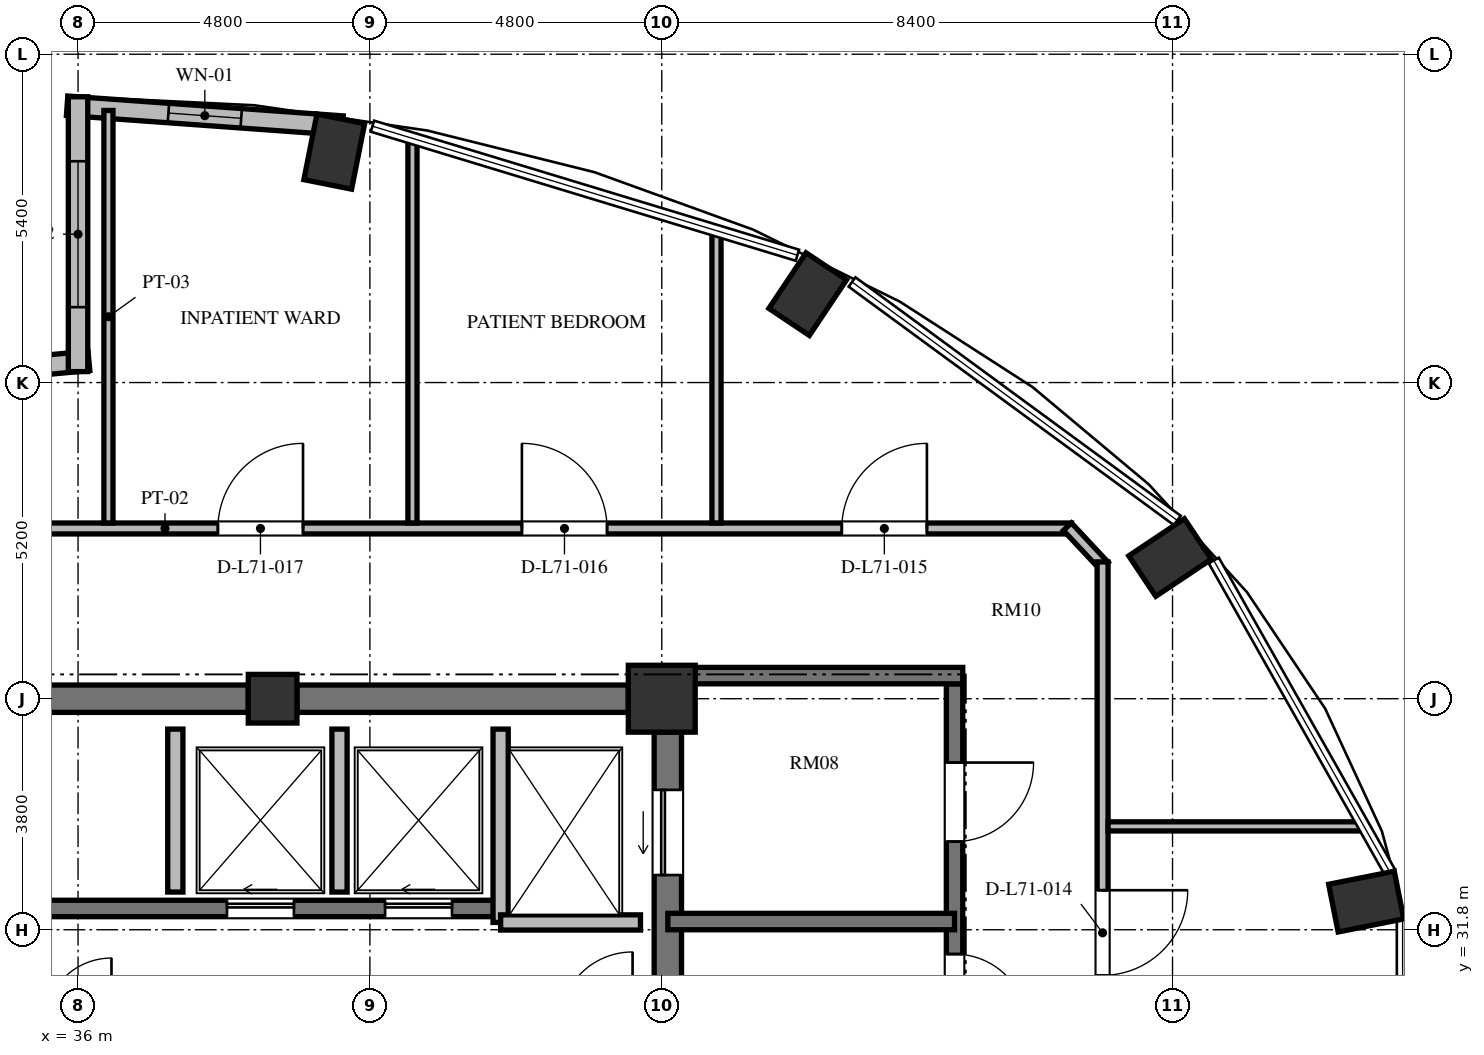
"""IFC4 building model, lengths in metres.
Left out: names, types, materials, properties, quantities, classifications, styles, units other than length and angle.
Written with IfcOpenShell. Run it as: python <this file> out.ifc"""

import sys

from ifc_helpers import new_model, si_unit, direction, frame, frame_2d, origin, origin_2d, place, context, subcontext, project, spatial, rectangle, extrude, element, fill, save


model = new_model("IFC4")
c1 = context("Model", 3, precision=1e-05, world=origin(), true_north=direction((0.0, 1.0)))
c2 = subcontext(c1, "Body", "Model", "MODEL_VIEW")
j1 = project(units=[si_unit("LENGTHUNIT", "METRE"), si_unit("PLANEANGLEUNIT", "RADIAN")], contexts=[c1])
p1 = place(None, origin())
s1 = spatial("IfcSite", under=j1, at=p1, CompositionType="ELEMENT")
p2 = place(p1, origin())
s2 = spatial("IfcBuilding", under=s1, at=p2, CompositionType="ELEMENT")
p3 = place(p2, frame((0.0, 0.0, 273.264)))
s3 = spatial("IfcBuildingStorey", under=s2, at=p3, CompositionType="ELEMENT", Elevation=273.264)
for number, where, z_axis, x_axis in (
    (1, (57.185, 32.263, 0.0), (0.0, 0.0, 1.0), (0.981, 0.195, 0.0)),
    (2, (53.96, 37.923, 0.0), (0.0, 0.0, 1.0), (0.831, 0.556, 0.0)),
    (3, (48.0, 42.254, 0.0), (0.0, 0.0, 1.0), (0.556, 0.831, 0.0)),
    (4, (40.214, 44.598, 0.0), (0.0, 0.0, 1.0), (0.195, 0.981, 0.0)),
):
    element("IfcColumn", number, at=place(p3, frame(where, z_axis=z_axis, x_axis=x_axis)), inside=s3, PredefinedType="COLUMN", context=c2, shape_type="SweptSolid", body=[
        extrude(rectangle(XDim=1.1, YDim=0.8, at=origin_2d()), origin(), (0.0, 0.0, 1.0), 3.648),
    ])
p4 = place(p3, frame((45.6, 35.6, 0.0), z_axis=(0.0, 0.0, 1.0), x_axis=(1.0, 0.0, 0.0)))
e5 = element("IfcColumn", 5, at=p4, inside=s3, PredefinedType="COLUMN", context=c2, shape_type="SweptSolid", body=[
    extrude(rectangle(XDim=1.1, YDim=1.1, at=origin_2d()), origin(), (0.0, 0.0, 1.0), 3.648),
])
p5 = place(p3, frame((39.2, 35.6, 0.0), z_axis=(0.0, 0.0, 1.0), x_axis=(1.0, 0.0, 0.0)))
e6 = element("IfcColumn", 6, at=p5, inside=s3, PredefinedType="COLUMN", context=c2, shape_type="SweptSolid", body=[
    extrude(rectangle(XDim=0.8, YDim=0.8, at=origin_2d()), origin(), (0.0, 0.0, 1.0), 3.648),
])
p6 = place(p3, frame((45.7, 20.95, 0.0), z_axis=(0.0, 0.0, 1.0), x_axis=(0.0, 1.0, 0.0)))
e7 = element("IfcWall", 7, at=p6, inside=s3, PredefinedType="SHEAR", context=c2, shape_type="SweptSolid", body=[
    extrude(rectangle(XDim=14.1, YDim=0.45, at=frame_2d((7.05, 0.0))), origin(), (0.0, 0.0, 1.0), 3.648),
])
p7 = place(p6, frame((11.75, 0.0, 0.0)))
e8 = element("IfcOpeningElement", 8, at=p7, cuts=e7, PredefinedType="OPENING", context=c2, shape_type="SweptSolid", body=[
    extrude(rectangle(XDim=1.4, YDim=2.3, at=frame_2d((0.7, 1.15))), frame((0.0, 0.235, 0.0), z_axis=(0.0, -1.0, 0.0), x_axis=(1.0, 0.0, 0.0)), (0.0, 0.0, 1.0), 0.47),
])
p8 = place(p6, frame((0.95, 0.0, 0.0)))
e9 = element("IfcOpeningElement", 9, at=p8, cuts=e7, PredefinedType="OPENING", context=c2, shape_type="SweptSolid", body=[
    extrude(rectangle(XDim=1.4, YDim=2.3, at=frame_2d((0.7, 1.15))), frame((0.0, 0.235, 0.0), z_axis=(0.0, -1.0, 0.0), x_axis=(1.0, 0.0, 0.0)), (0.0, 0.0, 1.0), 0.47),
])
p9 = place(p3, frame((33.2, 35.6, 0.0), z_axis=(0.0, 0.0, 1.0), x_axis=(1.0, 0.0, 0.0)))
e10 = element("IfcWall", 10, at=p9, inside=s3, PredefinedType="SHEAR", context=c2, shape_type="SweptSolid", body=[
    extrude(rectangle(XDim=5.6, YDim=0.45, at=frame_2d((2.8, 0.0))), origin(), (0.0, 0.0, 1.0), 3.648),
])
p10 = place(p3, frame((39.6, 35.6, 0.0), z_axis=(0.0, 0.0, 1.0), x_axis=(1.0, 0.0, 0.0)))
e11 = element("IfcWall", 11, at=p10, inside=s3, PredefinedType="SHEAR", context=c2, shape_type="SweptSolid", body=[
    extrude(rectangle(XDim=5.45, YDim=0.45, at=frame_2d((2.725, 0.0))), origin(), (0.0, 0.0, 1.0), 3.648),
])
p11 = place(p3, frame((40.35, 45.026, 0.0), z_axis=(0.0, 0.0, 1.0), x_axis=(-0.997412917451, 0.071885131294, 0.0)))
e12 = element("IfcWall", 12, at=p11, inside=s3, PredefinedType="SOLIDWALL", context=c2, shape_type="SweptSolid", body=[
    extrude(rectangle(XDim=4.541, YDim=0.32, at=frame_2d((2.271, 0.0))), origin(), (0.0, 0.0, 1.0), 3.448),
])
p12 = place(p11, frame((1.67, 0.0, 0.85)))
e13 = element("IfcOpeningElement", 13, at=p12, cuts=e12, PredefinedType="OPENING", context=c2, shape_type="SweptSolid", body=[
    extrude(rectangle(XDim=1.2, YDim=2.2, at=frame_2d((0.6, 1.1))), frame((0.0, 0.17, 0.0), z_axis=(0.0, -1.0, 0.0), x_axis=(1.0, 0.0, 0.0)), (0.0, 0.0, 1.0), 0.34),
])
p13 = place(p3, frame((36.179, 41.156, 0.0), z_axis=(0.0, 0.0, 1.0), x_axis=(-0.995736155144, -0.092247001792, 0.0)))
e14 = element("IfcWall", 14, at=p13, inside=s3, PredefinedType="SOLIDWALL", context=c2, shape_type="SweptSolid", body=[
    extrude(rectangle(XDim=3.216, YDim=0.32, at=frame_2d((1.608, 0.0))), origin(), (0.0, 0.0, 1.0), 3.448),
])
p14 = place(p13, frame((1.008, 0.0, 0.85)))
e15 = element("IfcOpeningElement", 15, at=p14, cuts=e14, PredefinedType="OPENING", context=c2, shape_type="SweptSolid", body=[
    extrude(rectangle(XDim=1.2, YDim=1.8, at=frame_2d((0.6, 0.9))), frame((0.0, 0.17, 0.0), z_axis=(0.0, -1.0, 0.0), x_axis=(1.0, 0.0, 0.0)), (0.0, 0.0, 1.0), 0.34),
])
p15 = place(p3, frame((36.0, 45.5, 0.0), z_axis=(0.0, 0.0, 1.0), x_axis=(0.0, -1.0, 0.0)))
e16 = element("IfcWall", 16, at=p15, inside=s3, PredefinedType="SOLIDWALL", context=c2, shape_type="SweptSolid", body=[
    extrude(rectangle(XDim=4.52, YDim=0.32, at=frame_2d((2.26, 0.0))), origin(), (0.0, 0.0, 1.0), 3.448),
])
p16 = place(p15, frame((1.06, 0.0, 0.84)))
e17 = element("IfcOpeningElement", 17, at=p16, cuts=e16, PredefinedType="OPENING", context=c2, shape_type="SweptSolid", body=[
    extrude(rectangle(XDim=2.4, YDim=2.04, at=frame_2d((1.2, 1.02))), frame((0.0, 0.17, 0.0), z_axis=(0.0, -1.0, 0.0), x_axis=(1.0, 0.0, 0.0)), (0.0, 0.0, 1.0), 0.34),
])
p17 = place(p3, frame((26.55, 32.15, 0.0), z_axis=(0.0, 0.0, 1.0), x_axis=(1.0, 0.0, 0.0)))
e18 = element("IfcWall", 18, at=p17, inside=s3, PredefinedType="SHEAR", context=c2, shape_type="SweptSolid", body=[
    extrude(rectangle(XDim=16.4, YDim=0.27, at=frame_2d((8.2, 0.0))), origin(), (0.0, 0.0, 1.0), 3.648),
])
p18 = place(p17, frame((2.175, 0.0, 0.0)))
e19 = element("IfcOpeningElement", 19, at=p18, cuts=e18, PredefinedType="OPENING", context=c2, shape_type="SweptSolid", body=[
    extrude(rectangle(XDim=1.05, YDim=2.15, at=frame_2d((0.525, 1.075))), frame((0.0, 0.145, 0.0), z_axis=(0.0, -1.0, 0.0), x_axis=(1.0, 0.0, 0.0)), (0.0, 0.0, 1.0), 0.29),
])
p19 = place(p17, frame((7.575, 0.0, 0.0)))
e20 = element("IfcOpeningElement", 20, at=p19, cuts=e18, PredefinedType="OPENING", context=c2, shape_type="SweptSolid", body=[
    extrude(rectangle(XDim=1.05, YDim=2.15, at=frame_2d((0.525, 1.075))), frame((0.0, 0.145, 0.0), z_axis=(0.0, -1.0, 0.0), x_axis=(1.0, 0.0, 0.0)), (0.0, 0.0, 1.0), 0.29),
])
p20 = place(p17, frame((11.9, 0.0, 0.0)))
e21 = element("IfcOpeningElement", 21, at=p20, cuts=e18, PredefinedType="OPENING", context=c2, shape_type="SweptSolid", body=[
    extrude(rectangle(XDim=1.1, YDim=2.2, at=frame_2d((0.55, 1.1))), frame((0.0, 0.145, 0.0), z_axis=(0.0, -1.0, 0.0), x_axis=(1.0, 0.0, 0.0)), (0.0, 0.0, 1.0), 0.29),
])
p21 = place(p17, frame((14.5, 0.0, 0.0)))
e22 = element("IfcOpeningElement", 22, at=p21, cuts=e18, PredefinedType="OPENING", context=c2, shape_type="SweptSolid", body=[
    extrude(rectangle(XDim=1.1, YDim=2.2, at=frame_2d((0.55, 1.1))), frame((0.0, 0.145, 0.0), z_axis=(0.0, -1.0, 0.0), x_axis=(1.0, 0.0, 0.0)), (0.0, 0.0, 1.0), 0.29),
])
p22 = place(p3, frame((42.95, 31.92, 0.0), z_axis=(0.0, 0.0, 1.0), x_axis=(0.0, 1.0, 0.0)))
e23 = element("IfcWall", 23, at=p22, inside=s3, PredefinedType="SOLIDWALL", context=c2, shape_type="SweptSolid", body=[
    extrude(rectangle(XDim=3.18, YDim=0.25, at=frame_2d((1.59, 0.0))), origin(), (0.0, 0.0, 1.0), 3.448),
])
p23 = place(p3, frame((42.95, 31.92, 0.0), z_axis=(0.0, 0.0, 1.0), x_axis=(1.0, 0.0, 0.0)))
e24 = element("IfcWall", 24, at=p23, inside=s3, PredefinedType="SOLIDWALL", context=c2, shape_type="SweptSolid", body=[
    extrude(rectangle(XDim=2.3, YDim=0.25, at=frame_2d((1.15, 0.0))), origin(), (0.0, 0.0, 1.0), 3.448),
])
for number, where, z_axis, x_axis in (
    (25, (37.6, 32.42, 0.0), (0.0, 0.0, 1.0), (0.0, 1.0, 0.0)),
    (26, (40.3, 32.42, 0.0), (0.0, 0.0, 1.0), (0.0, 1.0, 0.0)),
):
    element("IfcWall", number, at=place(p3, frame(where, z_axis=z_axis, x_axis=x_axis)), inside=s3, PredefinedType="SOLIDWALL", context=c2, shape_type="SweptSolid", body=[
        extrude(rectangle(XDim=2.68, YDim=0.25, at=frame_2d((1.34, 0.0))), origin(), (0.0, 0.0, 1.0), 3.448),
    ])
p24 = place(p3, frame((50.415, 35.845, 0.0), z_axis=(0.0, 0.0, 1.0), x_axis=(0.0, -1.0, 0.0)))
e27 = element("IfcWall", 27, at=p24, inside=s3, PredefinedType="SHEAR", context=c2, shape_type="SweptSolid", body=[
    extrude(rectangle(XDim=15.825, YDim=0.27, at=frame_2d((7.913, 0.0))), origin(), (0.0, 0.0, 1.0), 3.648),
])
p25 = place(p24, frame((4.445, 0.0, 0.0)))
e28 = element("IfcOpeningElement", 28, at=p25, cuts=e27, PredefinedType="OPENING", context=c2, shape_type="SweptSolid", body=[
    extrude(rectangle(XDim=1.2, YDim=2.15, at=frame_2d((0.6, 1.075))), frame((0.0, 0.145, 0.0), z_axis=(0.0, -1.0, 0.0), x_axis=(1.0, 0.0, 0.0)), (0.0, 0.0, 1.0), 0.29),
])
p26 = place(p24, frame((1.295, 0.0, 0.0)))
e29 = element("IfcOpeningElement", 29, at=p26, cuts=e27, PredefinedType="OPENING", context=c2, shape_type="SweptSolid", body=[
    extrude(rectangle(XDim=1.3, YDim=2.2, at=frame_2d((0.65, 1.1))), frame((0.0, 0.145, 0.0), z_axis=(0.0, -1.0, 0.0), x_axis=(1.0, 0.0, 0.0)), (0.0, 0.0, 1.0), 0.29),
])
p27 = place(p24, frame((13.095, 0.0, 0.0)))
e30 = element("IfcOpeningElement", 30, at=p27, cuts=e27, PredefinedType="OPENING", context=c2, shape_type="SweptSolid", body=[
    extrude(rectangle(XDim=1.3, YDim=2.2, at=frame_2d((0.65, 1.1))), frame((0.0, 0.145, 0.0), z_axis=(0.0, -1.0, 0.0), x_axis=(1.0, 0.0, 0.0)), (0.0, 0.0, 1.0), 0.29),
])
p28 = place(p3, frame((45.925, 35.98, 0.0), z_axis=(0.0, 0.0, 1.0), x_axis=(1.0, 0.0, 0.0)))
e31 = element("IfcWall", 31, at=p28, inside=s3, PredefinedType="SHEAR", context=c2, shape_type="SweptSolid", body=[
    extrude(rectangle(XDim=4.625, YDim=0.27, at=frame_2d((2.312, 0.0))), origin(), (0.0, 0.0, 1.0), 3.648),
])
p29 = place(p3, frame((45.7, 31.935, 0.0), z_axis=(0.0, 0.0, 1.0), x_axis=(1.0, 0.0, 0.0)))
e32 = element("IfcWall", 32, at=p29, inside=s3, PredefinedType="SHEAR", context=c2, shape_type="SweptSolid", body=[
    extrude(rectangle(XDim=4.715, YDim=0.27, at=frame_2d((2.357, 0.0))), origin(), (0.0, 0.0, 1.0), 3.648),
])
p30 = place(p3, frame((32.46, 38.4, 0.0), z_axis=(0.0, 0.0, 1.0), x_axis=(1.0, 0.0, 0.0)))
e33 = element("IfcWall", 33, at=p30, inside=s3, PredefinedType="PARTITIONING", context=c2, shape_type="SweptSolid", body=[
    extrude(rectangle(XDim=19.879, YDim=0.18, at=frame_2d((9.939, 0.0))), origin(), (0.0, 0.0, 1.0), 3.073),
])
p31 = place(p30, frame((16.101, 0.0, 0.0)))
e34 = element("IfcOpeningElement", 34, at=p31, cuts=e33, PredefinedType="OPENING", context=c2, shape_type="SweptSolid", body=[
    extrude(rectangle(XDim=1.4, YDim=2.2, at=frame_2d((0.7, 1.1))), frame((0.0, 0.1, 0.0), z_axis=(0.0, -1.0, 0.0), x_axis=(1.0, 0.0, 0.0)), (0.0, 0.0, 1.0), 0.2),
])
p32 = place(p30, frame((10.84, 0.0, 0.0)))
e35 = element("IfcOpeningElement", 35, at=p32, cuts=e33, PredefinedType="OPENING", context=c2, shape_type="SweptSolid", body=[
    extrude(rectangle(XDim=1.4, YDim=2.2, at=frame_2d((0.7, 1.1))), frame((0.0, 0.1, 0.0), z_axis=(0.0, -1.0, 0.0), x_axis=(1.0, 0.0, 0.0)), (0.0, 0.0, 1.0), 0.2),
])
p33 = place(p30, frame((5.84, 0.0, 0.0)))
e36 = element("IfcOpeningElement", 36, at=p33, cuts=e33, PredefinedType="OPENING", context=c2, shape_type="SweptSolid", body=[
    extrude(rectangle(XDim=1.4, YDim=2.2, at=frame_2d((0.7, 1.1))), frame((0.0, 0.1, 0.0), z_axis=(0.0, -1.0, 0.0), x_axis=(1.0, 0.0, 0.0)), (0.0, 0.0, 1.0), 0.2),
])
p34 = place(p30, frame((1.479, 0.0, 0.0)))
e37 = element("IfcOpeningElement", 37, at=p34, cuts=e33, PredefinedType="OPENING", context=c2, shape_type="SweptSolid", body=[
    extrude(rectangle(XDim=1.4, YDim=2.2, at=frame_2d((0.7, 1.1))), frame((0.0, 0.1, 0.0), z_axis=(0.0, -1.0, 0.0), x_axis=(1.0, 0.0, 0.0)), (0.0, 0.0, 1.0), 0.2),
])
p35 = place(p3, frame((52.272, 38.429, 0.0), z_axis=(0.0, 0.0, 1.0), x_axis=(0.682475113459, -0.730908831188, 0.0)))
e38 = element("IfcWall", 38, at=p35, inside=s3, PredefinedType="PARTITIONING", context=c2, shape_type="SweptSolid", body=[
    extrude(rectangle(XDim=0.887, YDim=0.18, at=frame_2d((0.444, 0.0))), origin(), (0.0, 0.0, 1.0), 3.448),
])
p36 = place(p3, frame((52.85, 37.85, 0.0), z_axis=(0.0, 0.0, 1.0), x_axis=(0.0, -1.0, 0.0)))
e39 = element("IfcWall", 39, at=p36, inside=s3, PredefinedType="PARTITIONING", context=c2, shape_type="SweptSolid", body=[
    extrude(rectangle(XDim=17.3, YDim=0.18, at=frame_2d((8.65, 0.0))), origin(), (0.0, 0.0, 1.0), 3.448),
])
p37 = place(p36, frame((12.575, 0.0, 0.0)))
e40 = element("IfcOpeningElement", 40, at=p37, cuts=e39, PredefinedType="OPENING", context=c2, shape_type="SweptSolid", body=[
    extrude(rectangle(XDim=1.05, YDim=2.15, at=frame_2d((0.525, 1.075))), frame((0.0, 0.1, 0.0), z_axis=(0.0, -1.0, 0.0), x_axis=(1.0, 0.0, 0.0)), (0.0, 0.0, 1.0), 0.2),
])
p38 = place(p36, frame((8.9, 0.0, 0.0)))
e41 = element("IfcOpeningElement", 41, at=p38, cuts=e39, PredefinedType="OPENING", context=c2, shape_type="SweptSolid", body=[
    extrude(rectangle(XDim=1.4, YDim=2.2, at=frame_2d((0.7, 1.1))), frame((0.0, 0.1, 0.0), z_axis=(0.0, -1.0, 0.0), x_axis=(1.0, 0.0, 0.0)), (0.0, 0.0, 1.0), 0.2),
])
p39 = place(p36, frame((5.4, 0.0, 0.0)))
e42 = element("IfcOpeningElement", 42, at=p39, cuts=e39, PredefinedType="OPENING", context=c2, shape_type="SweptSolid", body=[
    extrude(rectangle(XDim=1.4, YDim=2.2, at=frame_2d((0.7, 1.1))), frame((0.0, 0.1, 0.0), z_axis=(0.0, -1.0, 0.0), x_axis=(1.0, 0.0, 0.0)), (0.0, 0.0, 1.0), 0.2),
])
p40 = place(p3, frame((52.94, 33.5, 0.0), z_axis=(0.0, 0.0, 1.0), x_axis=(1.0, 0.0, 0.0)))
e43 = element("IfcWall", 43, at=p40, inside=s3, PredefinedType="PARTITIONING", context=c2, shape_type="SweptSolid", body=[
    extrude(rectangle(XDim=4.199, YDim=0.15, at=frame_2d((2.1, 0.0))), origin(), (0.0, 0.0, 1.0), 3.448),
])
p41 = place(p3, frame((36.5, 38.49, 0.0), z_axis=(0.0, 0.0, 1.0), x_axis=(0.0, 1.0, 0.0)))
e44 = element("IfcWall", 44, at=p41, inside=s3, PredefinedType="PARTITIONING", context=c2, shape_type="SweptSolid", body=[
    extrude(rectangle(XDim=6.785, YDim=0.15, at=frame_2d((3.392, 0.0))), origin(), (0.0, 0.0, 1.0), 3.448),
])
p42 = place(p3, frame((41.5, 38.49, 0.0), z_axis=(0.0, 0.0, 1.0), x_axis=(0.0, 1.0, 0.0)))
e45 = element("IfcWall", 45, at=p42, inside=s3, PredefinedType="PARTITIONING", context=c2, shape_type="SweptSolid", body=[
    extrude(rectangle(XDim=6.31, YDim=0.15, at=frame_2d((3.155, 0.0))), origin(), (0.0, 0.0, 1.0), 3.448),
])
p43 = place(p3, frame((46.5, 38.49, 0.0), z_axis=(0.0, 0.0, 1.0), x_axis=(0.0, 1.0, 0.0)))
e46 = element("IfcWall", 46, at=p43, inside=s3, PredefinedType="PARTITIONING", context=c2, shape_type="SweptSolid", body=[
    extrude(rectangle(XDim=4.791, YDim=0.15, at=frame_2d((2.396, 0.0))), origin(), (0.0, 0.0, 1.0), 3.448),
])
p44 = place(p12, origin())
e47 = element("IfcWindow", 47, at=p44, inside=s3, PartitioningType="SINGLE_PANEL", PredefinedType="WINDOW", context=c2, shape_type="SweptSolid", body=[
    extrude(rectangle(XDim=1.2, YDim=2.2, at=frame_2d((0.6, 1.1))), frame((0.0, 0.03, 0.0), z_axis=(0.0, -1.0, 0.0), x_axis=(1.0, 0.0, 0.0)), (0.0, 0.0, 1.0), 0.06),
])
fill(e13, e47)
p45 = place(p16, origin())
e48 = element("IfcWindow", 48, at=p45, inside=s3, PartitioningType="SINGLE_PANEL", PredefinedType="WINDOW", context=c2, shape_type="SweptSolid", body=[
    extrude(rectangle(XDim=2.4, YDim=2.04, at=frame_2d((1.2, 1.02))), frame((0.0, 0.03, 0.0), z_axis=(0.0, -1.0, 0.0), x_axis=(1.0, 0.0, 0.0)), (0.0, 0.0, 1.0), 0.06),
])
fill(e17, e48)
p46 = place(p20, origin())
e49 = element("IfcDoor", 49, at=p46, inside=s3, OperationType="SLIDING_TO_LEFT", PredefinedType="DOOR", context=c2, shape_type="SweptSolid", body=[
    extrude(rectangle(XDim=1.1, YDim=2.2, at=frame_2d((0.55, 1.1))), frame((0.0, 0.025, 0.0), z_axis=(0.0, -1.0, 0.0), x_axis=(1.0, 0.0, 0.0)), (0.0, 0.0, 1.0), 0.05),
])
fill(e21, e49)
p47 = place(p21, origin())
e50 = element("IfcDoor", 50, at=p47, inside=s3, OperationType="SLIDING_TO_LEFT", PredefinedType="DOOR", context=c2, shape_type="SweptSolid", body=[
    extrude(rectangle(XDim=1.1, YDim=2.2, at=frame_2d((0.55, 1.1))), frame((0.0, 0.025, 0.0), z_axis=(0.0, -1.0, 0.0), x_axis=(1.0, 0.0, 0.0)), (0.0, 0.0, 1.0), 0.05),
])
fill(e22, e50)
p48 = place(p7, origin())
e51 = element("IfcDoor", 51, at=p48, inside=s3, OperationType="SLIDING_TO_LEFT", PredefinedType="DOOR", context=c2, shape_type="SweptSolid", body=[
    extrude(rectangle(XDim=1.4, YDim=2.3, at=frame_2d((0.7, 1.15))), frame((0.0, 0.025, 0.0), z_axis=(0.0, -1.0, 0.0), x_axis=(1.0, 0.0, 0.0)), (0.0, 0.0, 1.0), 0.05),
])
fill(e8, e51)
p49 = place(p25, origin())
e52 = element("IfcDoor", 52, at=p49, inside=s3, OperationType="SINGLE_SWING_RIGHT", PredefinedType="DOOR", context=c2, shape_type="SweptSolid", body=[
    extrude(rectangle(XDim=1.2, YDim=2.15, at=frame_2d((0.6, 1.075))), frame((0.0, 0.025, 0.0), z_axis=(0.0, -1.0, 0.0), x_axis=(1.0, 0.0, 0.0)), (0.0, 0.0, 1.0), 0.05),
])
fill(e28, e52)
p50 = place(p26, origin())
e53 = element("IfcDoor", 53, at=p50, inside=s3, OperationType="SINGLE_SWING_LEFT", PredefinedType="DOOR", context=c2, shape_type="SweptSolid", body=[
    extrude(rectangle(XDim=1.3, YDim=2.2, at=frame_2d((0.65, 1.1))), frame((0.0, 0.025, 0.0), z_axis=(0.0, -1.0, 0.0), x_axis=(1.0, 0.0, 0.0)), (0.0, 0.0, 1.0), 0.05),
])
fill(e29, e53)
p51 = place(p39, origin())
e54 = element("IfcDoor", 54, at=p51, inside=s3, OperationType="SINGLE_SWING_LEFT", PredefinedType="DOOR", context=c2, shape_type="SweptSolid", body=[
    extrude(rectangle(XDim=1.4, YDim=2.2, at=frame_2d((0.7, 1.1))), frame((0.0, 0.025, 0.0), z_axis=(0.0, -1.0, 0.0), x_axis=(1.0, 0.0, 0.0)), (0.0, 0.0, 1.0), 0.05),
])
fill(e42, e54)
p52 = place(p31, origin())
e55 = element("IfcDoor", 55, at=p52, inside=s3, OperationType="SINGLE_SWING_RIGHT", PredefinedType="DOOR", context=c2, shape_type="SweptSolid", body=[
    extrude(rectangle(XDim=1.4, YDim=2.2, at=frame_2d((0.7, 1.1))), frame((0.0, 0.025, 0.0), z_axis=(0.0, -1.0, 0.0), x_axis=(1.0, 0.0, 0.0)), (0.0, 0.0, 1.0), 0.05),
])
fill(e34, e55)
p53 = place(p32, origin())
e56 = element("IfcDoor", 56, at=p53, inside=s3, OperationType="SINGLE_SWING_LEFT", PredefinedType="DOOR", context=c2, shape_type="SweptSolid", body=[
    extrude(rectangle(XDim=1.4, YDim=2.2, at=frame_2d((0.7, 1.1))), frame((0.0, 0.025, 0.0), z_axis=(0.0, -1.0, 0.0), x_axis=(1.0, 0.0, 0.0)), (0.0, 0.0, 1.0), 0.05),
])
fill(e35, e56)
p54 = place(p33, origin())
e57 = element("IfcDoor", 57, at=p54, inside=s3, OperationType="SINGLE_SWING_RIGHT", PredefinedType="DOOR", context=c2, shape_type="SweptSolid", body=[
    extrude(rectangle(XDim=1.4, YDim=2.2, at=frame_2d((0.7, 1.1))), frame((0.0, 0.025, 0.0), z_axis=(0.0, -1.0, 0.0), x_axis=(1.0, 0.0, 0.0)), (0.0, 0.0, 1.0), 0.05),
])
fill(e36, e57)
save(model, sys.argv[1])
